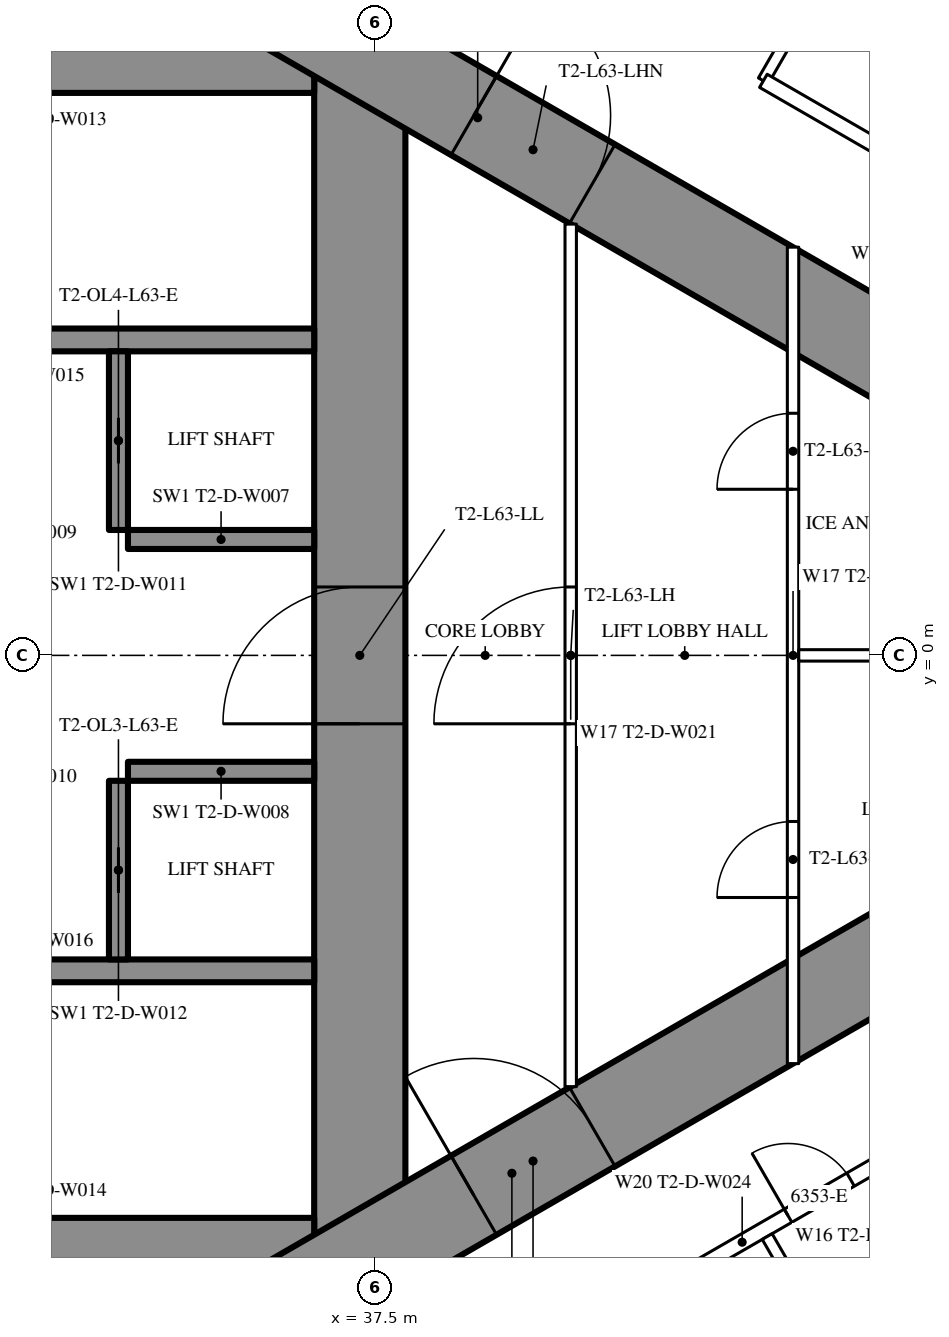
"""IFC4 building model, lengths in metres.
Left out: names, types, materials, properties, quantities, classifications, styles, units other than length and angle.
Written with IfcOpenShell. Run it as: python <this file> out.ifc"""

import sys

from ifc_helpers import new_model, si_unit, direction, frame, frame_2d, origin, place, context, subcontext, project, spatial, rectangle, extrude, element, fill, save


model = new_model("IFC4")
c1 = context("Model", 3, precision=1e-05, world=origin(), true_north=direction((0.0, 1.0)))
c2 = subcontext(c1, "Body", "Model", "MODEL_VIEW")
j1 = project(units=[si_unit("LENGTHUNIT", "METRE"), si_unit("PLANEANGLEUNIT", "RADIAN")], contexts=[c1])
p1 = place(None, origin())
s1 = spatial("IfcSite", under=j1, at=p1, CompositionType="ELEMENT")
p2 = place(p1, origin())
s2 = spatial("IfcBuilding", under=s1, at=p2, CompositionType="ELEMENT")
p3 = place(p2, frame((0.0, 0.0, 236.9)))
s3 = spatial("IfcBuildingStorey", under=s2, at=p3, CompositionType="ELEMENT", Elevation=236.9)
p4 = place(p3, frame((37.3, -8.6, 0.0), z_axis=(0.0, 0.0, 1.0), x_axis=(0.0, 1.0, 0.0)))
e1 = element("IfcWall", 1, at=p4, inside=s3, PredefinedType="SHEAR", context=c2, shape_type="SweptSolid", body=[
    extrude(rectangle(XDim=17.2, YDim=1.2, at=frame_2d((8.6, 0.0))), origin(), (0.0, 0.0, 1.0), 3.6),
])
p5 = place(p4, frame((7.7, 0.0, 0.0)))
e2 = element("IfcOpeningElement", 2, at=p5, cuts=e1, PredefinedType="OPENING", context=c2, shape_type="SweptSolid", body=[
    extrude(rectangle(XDim=1.8, YDim=2.2, at=frame_2d((0.9, 1.1))), frame((0.0, 0.61, 0.0), z_axis=(0.0, -1.0, 0.0), x_axis=(1.0, 0.0, 0.0)), (0.0, 0.0, 1.0), 1.22),
])
p6 = place(p3, frame((28.3, -8.0, 0.0), z_axis=(0.0, 0.0, 1.0), x_axis=(1.0, 0.0, 0.0)))
e3 = element("IfcWall", 3, at=p6, inside=s3, PredefinedType="SHEAR", context=c2, shape_type="SweptSolid", body=[
    extrude(rectangle(XDim=8.4, YDim=1.2, at=frame_2d((4.2, 0.0))), origin(), (0.0, 0.0, 1.0), 3.6),
])
p7 = place(p6, frame((0.25, 0.0, 0.0)))
e4 = element("IfcOpeningElement", 4, at=p7, cuts=e3, PredefinedType="OPENING", context=c2, shape_type="SweptSolid", body=[
    extrude(rectangle(XDim=1.0, YDim=2.2, at=frame_2d((0.5, 1.1))), frame((0.0, 0.61, 0.0), z_axis=(0.0, -1.0, 0.0), x_axis=(1.0, 0.0, 0.0)), (0.0, 0.0, 1.0), 1.22),
])
p8 = place(p3, frame((28.3, 8.0, 0.0), z_axis=(0.0, 0.0, 1.0), x_axis=(1.0, 0.0, 0.0)))
e5 = element("IfcWall", 5, at=p8, inside=s3, PredefinedType="SHEAR", context=c2, shape_type="SweptSolid", body=[
    extrude(rectangle(XDim=8.4, YDim=1.2, at=frame_2d((4.2, 0.0))), origin(), (0.0, 0.0, 1.0), 3.6),
])
p9 = place(p8, frame((0.25, 0.0, 0.0)))
e6 = element("IfcOpeningElement", 6, at=p9, cuts=e5, PredefinedType="OPENING", context=c2, shape_type="SweptSolid", body=[
    extrude(rectangle(XDim=1.0, YDim=2.2, at=frame_2d((0.5, 1.1))), frame((0.0, 0.61, 0.0), z_axis=(0.0, -1.0, 0.0), x_axis=(1.0, 0.0, 0.0)), (0.0, 0.0, 1.0), 1.22),
])
for number, where, z_axis, x_axis in (
    (7, (28.3, -4.15, 0.0), (0.0, 0.0, 1.0), (1.0, 0.0, 0.0)),
    (8, (28.3, 4.15, 0.0), (0.0, 0.0, 1.0), (1.0, 0.0, 0.0)),
):
    element("IfcWall", number, at=place(p3, frame(where, z_axis=z_axis, x_axis=x_axis)), inside=s3, PredefinedType="SHEAR", context=c2, shape_type="SweptSolid", body=[
        extrude(rectangle(XDim=8.4, YDim=0.3, at=frame_2d((4.2, 0.0))), origin(), (0.0, 0.0, 1.0), 3.6),
    ])
p10 = place(p3, frame((34.125, -4.0, 0.0), z_axis=(0.0, 0.0, 1.0), x_axis=(0.0, 1.0, 0.0)))
e9 = element("IfcWall", 9, at=p10, inside=s3, PredefinedType="SHEAR", context=c2, shape_type="SweptSolid", body=[
    extrude(rectangle(XDim=2.35, YDim=0.25, at=frame_2d((1.175, 0.0))), origin(), (0.0, 0.0, 1.0), 3.6),
])
p11 = place(p10, frame((0.875, 0.0, 0.0)))
e10 = element("IfcOpeningElement", 10, at=p11, cuts=e9, PredefinedType="OPENING", context=c2, shape_type="SweptSolid", body=[
    extrude(rectangle(XDim=0.6, YDim=2.0, at=frame_2d((0.3, 1.0))), frame((0.0, 0.135, 0.0), z_axis=(0.0, -1.0, 0.0), x_axis=(1.0, 0.0, 0.0)), (0.0, 0.0, 1.0), 0.27),
])
p12 = place(p3, frame((34.25, -1.525, 0.0), z_axis=(0.0, 0.0, 1.0), x_axis=(1.0, 0.0, 0.0)))
e11 = element("IfcWall", 11, at=p12, inside=s3, PredefinedType="SHEAR", context=c2, shape_type="SweptSolid", body=[
    extrude(rectangle(XDim=2.45, YDim=0.25, at=frame_2d((1.225, 0.0))), origin(), (0.0, 0.0, 1.0), 3.6),
])
p13 = place(p3, frame((34.125, 1.65, 0.0), z_axis=(0.0, 0.0, 1.0), x_axis=(0.0, 1.0, 0.0)))
e12 = element("IfcWall", 12, at=p13, inside=s3, PredefinedType="SHEAR", context=c2, shape_type="SweptSolid", body=[
    extrude(rectangle(XDim=2.35, YDim=0.25, at=frame_2d((1.175, 0.0))), origin(), (0.0, 0.0, 1.0), 3.6),
])
p14 = place(p13, frame((0.875, 0.0, 0.0)))
e13 = element("IfcOpeningElement", 13, at=p14, cuts=e12, PredefinedType="OPENING", context=c2, shape_type="SweptSolid", body=[
    extrude(rectangle(XDim=0.6, YDim=2.0, at=frame_2d((0.3, 1.0))), frame((0.0, 0.135, 0.0), z_axis=(0.0, -1.0, 0.0), x_axis=(1.0, 0.0, 0.0)), (0.0, 0.0, 1.0), 0.27),
])
p15 = place(p3, frame((34.25, 1.525, 0.0), z_axis=(0.0, 0.0, 1.0), x_axis=(1.0, 0.0, 0.0)))
e14 = element("IfcWall", 14, at=p15, inside=s3, PredefinedType="SHEAR", context=c2, shape_type="SweptSolid", body=[
    extrude(rectangle(XDim=2.45, YDim=0.25, at=frame_2d((1.225, 0.0))), origin(), (0.0, 0.0, 1.0), 3.6),
])
p16 = place(p3, frame((27.2, -13.8, 0.0), z_axis=(0.0, 0.0, 1.0), x_axis=(0.866027159892, 0.499996958321, 0.0)))
e15 = element("IfcWall", 15, at=p16, inside=s3, PredefinedType="SHEAR", context=c2, shape_type="SweptSolid", body=[
    extrude(rectangle(XDim=27.947, YDim=1.2, at=frame_2d((13.973, 0.0))), origin(), (0.0, 0.0, 1.0), 3.6),
])
p17 = place(p16, frame((4.6, 0.0, 0.0)))
e16 = element("IfcOpeningElement", 16, at=p17, cuts=e15, PredefinedType="OPENING", context=c2, shape_type="SweptSolid", body=[
    extrude(rectangle(XDim=1.0, YDim=2.2, at=frame_2d((0.5, 1.1))), frame((0.0, 0.61, 0.0), z_axis=(0.0, -1.0, 0.0), x_axis=(1.0, 0.0, 0.0)), (0.0, 0.0, 1.0), 1.22),
])
p18 = place(p16, frame((13.395, 0.0, 0.0)))
e17 = element("IfcOpeningElement", 17, at=p18, cuts=e15, PredefinedType="OPENING", context=c2, shape_type="SweptSolid", body=[
    extrude(rectangle(XDim=1.8, YDim=2.2, at=frame_2d((0.9, 1.1))), frame((0.0, 0.61, 0.0), z_axis=(0.0, -1.0, 0.0), x_axis=(1.0, 0.0, 0.0)), (0.0, 0.0, 1.0), 1.22),
])
p19 = place(p3, frame((27.2, 13.8, 0.0), z_axis=(0.0, 0.0, 1.0), x_axis=(0.866024515034, -0.500001539357, 0.0)))
e18 = element("IfcWall", 18, at=p19, inside=s3, PredefinedType="SHEAR", context=c2, shape_type="SweptSolid", body=[
    extrude(rectangle(XDim=26.907, YDim=1.2, at=frame_2d((13.454, 0.0))), origin(), (0.0, 0.0, 1.0), 3.6),
])
p20 = place(p19, frame((4.6, 0.0, 0.0)))
e19 = element("IfcOpeningElement", 19, at=p20, cuts=e18, PredefinedType="OPENING", context=c2, shape_type="SweptSolid", body=[
    extrude(rectangle(XDim=1.0, YDim=2.2, at=frame_2d((0.5, 1.1))), frame((0.0, 0.61, 0.0), z_axis=(0.0, -1.0, 0.0), x_axis=(1.0, 0.0, 0.0)), (0.0, 0.0, 1.0), 1.22),
])
p21 = place(p19, frame((13.395, 0.0, 0.0)))
e20 = element("IfcOpeningElement", 20, at=p21, cuts=e18, PredefinedType="OPENING", context=c2, shape_type="SweptSolid", body=[
    extrude(rectangle(XDim=1.8, YDim=2.2, at=frame_2d((0.9, 1.1))), frame((0.0, 0.61, 0.0), z_axis=(0.0, -1.0, 0.0), x_axis=(1.0, 0.0, 0.0)), (0.0, 0.0, 1.0), 1.22),
])
p22 = place(p3, frame((28.959, -15.44, 0.0), z_axis=(0.0, 0.0, 1.0), x_axis=(0.866025227435, 0.500000305447, 0.0)))
e21 = element("IfcWall", 21, at=p22, inside=s3, PredefinedType="PARTITIONING", context=c2, shape_type="SweptSolid", body=[
    extrude(rectangle(XDim=30.88, YDim=0.2, at=frame_2d((15.44, 0.0))), origin(), (0.0, 0.0, 1.0), 3.35),
])
p23 = place(p22, frame((1.494, 0.0, 0.0)))
e22 = element("IfcOpeningElement", 22, at=p23, cuts=e21, PredefinedType="OPENING", context=c2, shape_type="SweptSolid", body=[
    extrude(rectangle(XDim=1.8, YDim=2.03, at=frame_2d((0.9, 1.015))), frame((0.0, 0.11, 0.0), z_axis=(0.0, -1.0, 0.0), x_axis=(1.0, 0.0, 0.0)), (0.0, 0.0, 1.0), 0.22),
])
p24 = place(p22, frame((7.687, 0.0, 0.0)))
e23 = element("IfcOpeningElement", 23, at=p24, cuts=e21, PredefinedType="OPENING", context=c2, shape_type="SweptSolid", body=[
    extrude(rectangle(XDim=1.0, YDim=2.2, at=frame_2d((0.5, 1.1))), frame((0.0, 0.11, 0.0), z_axis=(0.0, -1.0, 0.0), x_axis=(1.0, 0.0, 0.0)), (0.0, 0.0, 1.0), 0.22),
])
p25 = place(p22, frame((16.137, 0.0, 0.0)))
e24 = element("IfcOpeningElement", 24, at=p25, cuts=e21, PredefinedType="OPENING", context=c2, shape_type="SweptSolid", body=[
    extrude(rectangle(XDim=0.95, YDim=2.2, at=frame_2d((0.475, 1.1))), frame((0.0, 0.11, 0.0), z_axis=(0.0, -1.0, 0.0), x_axis=(1.0, 0.0, 0.0)), (0.0, 0.0, 1.0), 0.22),
])
p26 = place(p22, frame((20.021, 0.0, 0.0)))
e25 = element("IfcOpeningElement", 25, at=p26, cuts=e21, PredefinedType="OPENING", context=c2, shape_type="SweptSolid", body=[
    extrude(rectangle(XDim=0.95, YDim=2.2, at=frame_2d((0.475, 1.1))), frame((0.0, 0.11, 0.0), z_axis=(0.0, -1.0, 0.0), x_axis=(1.0, 0.0, 0.0)), (0.0, 0.0, 1.0), 0.22),
])
p27 = place(p22, frame((26.253, 0.0, 0.0)))
e26 = element("IfcOpeningElement", 26, at=p27, cuts=e21, PredefinedType="OPENING", context=c2, shape_type="SweptSolid", body=[
    extrude(rectangle(XDim=0.95, YDim=2.2, at=frame_2d((0.475, 1.1))), frame((0.0, 0.11, 0.0), z_axis=(0.0, -1.0, 0.0), x_axis=(1.0, 0.0, 0.0)), (0.0, 0.0, 1.0), 0.22),
])
p28 = place(p3, frame((42.66, -7.646, 0.0), z_axis=(0.0, 0.0, 1.0), x_axis=(0.499996592859, -0.866027370889, 0.0)))
e27 = element("IfcWall", 27, at=p28, inside=s3, PredefinedType="PARTITIONING", context=c2, shape_type="SweptSolid", body=[
    extrude(rectangle(XDim=6.398, YDim=0.15, at=frame_2d((3.199, 0.0))), origin(), (0.0, 0.0, 1.0), 2.45),
])
p29 = place(p3, frame((42.61, 7.559, 0.0), z_axis=(0.0, 0.0, 1.0), x_axis=(0.500014058812, 0.866017286774, 0.0)))
e28 = element("IfcWall", 28, at=p29, inside=s3, PredefinedType="PARTITIONING", context=c2, shape_type="SweptSolid", body=[
    extrude(rectangle(XDim=6.498, YDim=0.15, at=frame_2d((3.249, 0.0))), origin(), (0.0, 0.0, 1.0), 2.45),
])
p30 = place(p3, frame((43.425, -8.821, 0.0), z_axis=(0.0, 0.0, 1.0), x_axis=(0.866006523861, 0.500032699561, 0.0)))
e29 = element("IfcWall", 29, at=p30, inside=s3, PredefinedType="PARTITIONING", context=c2, shape_type="SweptSolid", body=[
    extrude(rectangle(XDim=2.475, YDim=0.15, at=frame_2d((1.237, 0.0))), origin(), (0.0, 0.0, 1.0), 3.35),
])
p31 = place(p3, frame((42.61, 7.559, 0.0), z_axis=(0.0, 0.0, 1.0), x_axis=(0.866032081755, -0.499988433238, 0.0)))
e30 = element("IfcWall", 30, at=p31, inside=s3, PredefinedType="PARTITIONING", context=c2, shape_type="SweptSolid", body=[
    extrude(rectangle(XDim=4.741, YDim=0.2, at=frame_2d((2.37, 0.0))), origin(), (0.0, 0.0, 1.0), 3.35),
])
p32 = place(p31, frame((2.725, 0.0, 0.0)))
e31 = element("IfcOpeningElement", 31, at=p32, cuts=e30, PredefinedType="OPENING", context=c2, shape_type="SweptSolid", body=[
    extrude(rectangle(XDim=0.95, YDim=2.2, at=frame_2d((0.475, 1.1))), frame((0.0, 0.11, 0.0), z_axis=(0.0, -1.0, 0.0), x_axis=(1.0, 0.0, 0.0)), (0.0, 0.0, 1.0), 0.22),
])
p33 = place(p3, frame((40.075, -5.674, 0.0), z_axis=(0.0, 0.0, 1.0), x_axis=(0.0, 1.0, 0.0)))
e32 = element("IfcWall", 32, at=p33, inside=s3, PredefinedType="PARTITIONING", context=c2, shape_type="SweptSolid", body=[
    extrude(rectangle(XDim=11.348, YDim=0.15, at=frame_2d((5.674, 0.0))), origin(), (0.0, 0.0, 1.0), 3.35),
])
p34 = place(p33, frame((4.774, 0.0, 0.0)))
e33 = element("IfcOpeningElement", 33, at=p34, cuts=e32, PredefinedType="OPENING", context=c2, shape_type="SweptSolid", body=[
    extrude(rectangle(XDim=1.8, YDim=2.2, at=frame_2d((0.9, 1.1))), frame((0.0, 0.085, 0.0), z_axis=(0.0, -1.0, 0.0), x_axis=(1.0, 0.0, 0.0)), (0.0, 0.0, 1.0), 0.17),
])
p35 = place(p3, frame((43.0, -5.371, 0.0), z_axis=(0.0, 0.0, 1.0), x_axis=(0.0, 1.0, 0.0)))
e34 = element("IfcWall", 34, at=p35, inside=s3, PredefinedType="PARTITIONING", context=c2, shape_type="SweptSolid", body=[
    extrude(rectangle(XDim=10.741, YDim=0.15, at=frame_2d((5.371, 0.0))), origin(), (0.0, 0.0, 1.0), 3.35),
])
p36 = place(p35, frame((2.185, 0.0, 0.0)))
e35 = element("IfcOpeningElement", 35, at=p36, cuts=e34, PredefinedType="OPENING", context=c2, shape_type="SweptSolid", body=[
    extrude(rectangle(XDim=1.0, YDim=2.2, at=frame_2d((0.5, 1.1))), frame((0.0, 0.085, 0.0), z_axis=(0.0, -1.0, 0.0), x_axis=(1.0, 0.0, 0.0)), (0.0, 0.0, 1.0), 0.17),
])
p37 = place(p35, frame((7.556, 0.0, 0.0)))
e36 = element("IfcOpeningElement", 36, at=p37, cuts=e34, PredefinedType="OPENING", context=c2, shape_type="SweptSolid", body=[
    extrude(rectangle(XDim=1.0, YDim=2.2, at=frame_2d((0.5, 1.1))), frame((0.0, 0.085, 0.0), z_axis=(0.0, -1.0, 0.0), x_axis=(1.0, 0.0, 0.0)), (0.0, 0.0, 1.0), 0.17),
])
p38 = place(p3, frame((43.075, 0.0, 0.0), z_axis=(0.0, 0.0, 1.0), x_axis=(1.0, 0.0, 0.0)))
e37 = element("IfcWall", 37, at=p38, inside=s3, PredefinedType="PARTITIONING", context=c2, shape_type="SweptSolid", body=[
    extrude(rectangle(XDim=9.227, YDim=0.15, at=frame_2d((4.614, 0.0))), origin(), (0.0, 0.0, 1.0), 2.45),
])
p39 = place(p25, origin())
e38 = element("IfcDoor", 38, at=p39, inside=s3, OperationType="SINGLE_SWING_LEFT", PredefinedType="DOOR", context=c2, shape_type="SweptSolid", body=[
    extrude(rectangle(XDim=0.95, YDim=2.2, at=frame_2d((0.475, 1.1))), frame((0.0, 0.025, 0.0), z_axis=(0.0, -1.0, 0.0), x_axis=(1.0, 0.0, 0.0)), (0.0, 0.0, 1.0), 0.05),
])
fill(e24, e38)
p40 = place(p34, origin())
e39 = element("IfcDoor", 39, at=p40, inside=s3, OperationType="DOUBLE_DOOR_SINGLE_SWING", PredefinedType="DOOR", context=c2, shape_type="SweptSolid", body=[
    extrude(rectangle(XDim=1.8, YDim=2.2, at=frame_2d((0.9, 1.1))), frame((0.0, 0.025, 0.0), z_axis=(0.0, -1.0, 0.0), x_axis=(1.0, 0.0, 0.0)), (0.0, 0.0, 1.0), 0.05),
])
fill(e33, e39)
p41 = place(p36, origin())
e40 = element("IfcDoor", 40, at=p41, inside=s3, OperationType="SINGLE_SWING_LEFT", PredefinedType="DOOR", context=c2, shape_type="SweptSolid", body=[
    extrude(rectangle(XDim=1.0, YDim=2.2, at=frame_2d((0.5, 1.1))), frame((0.0, 0.025, 0.0), z_axis=(0.0, -1.0, 0.0), x_axis=(1.0, 0.0, 0.0)), (0.0, 0.0, 1.0), 0.05),
])
fill(e35, e40)
p42 = place(p37, origin())
e41 = element("IfcDoor", 41, at=p42, inside=s3, OperationType="SINGLE_SWING_LEFT", PredefinedType="DOOR", context=c2, shape_type="SweptSolid", body=[
    extrude(rectangle(XDim=1.0, YDim=2.2, at=frame_2d((0.5, 1.1))), frame((0.0, 0.025, 0.0), z_axis=(0.0, -1.0, 0.0), x_axis=(1.0, 0.0, 0.0)), (0.0, 0.0, 1.0), 0.05),
])
fill(e36, e41)
p43 = place(p18, origin())
e42 = element("IfcDoor", 42, at=p43, inside=s3, OperationType="DOUBLE_DOOR_SINGLE_SWING", PredefinedType="DOOR", context=c2, shape_type="SweptSolid", body=[
    extrude(rectangle(XDim=1.8, YDim=2.2, at=frame_2d((0.9, 1.1))), frame((0.0, 0.025, 0.0), z_axis=(0.0, -1.0, 0.0), x_axis=(1.0, 0.0, 0.0)), (0.0, 0.0, 1.0), 0.05),
])
fill(e17, e42)
p44 = place(p21, origin())
e43 = element("IfcDoor", 43, at=p44, inside=s3, OperationType="DOUBLE_DOOR_SINGLE_SWING", PredefinedType="DOOR", context=c2, shape_type="SweptSolid", body=[
    extrude(rectangle(XDim=1.8, YDim=2.2, at=frame_2d((0.9, 1.1))), frame((0.0, 0.025, 0.0), z_axis=(0.0, -1.0, 0.0), x_axis=(1.0, 0.0, 0.0)), (0.0, 0.0, 1.0), 0.05),
])
fill(e20, e43)
p45 = place(p5, origin())
e44 = element("IfcDoor", 44, at=p45, inside=s3, OperationType="DOUBLE_DOOR_SINGLE_SWING", PredefinedType="DOOR", context=c2, shape_type="SweptSolid", body=[
    extrude(rectangle(XDim=1.8, YDim=2.2, at=frame_2d((0.9, 1.1))), frame((0.0, 0.025, 0.0), z_axis=(0.0, -1.0, 0.0), x_axis=(1.0, 0.0, 0.0)), (0.0, 0.0, 1.0), 0.05),
])
fill(e2, e44)
p46 = place(p11, origin())
e45 = element("IfcDoor", 45, at=p46, inside=s3, OperationType="SLIDING_TO_LEFT", PredefinedType="DOOR", context=c2, shape_type="SweptSolid", body=[
    extrude(rectangle(XDim=0.6, YDim=2.0, at=frame_2d((0.3, 1.0))), frame((0.0, 0.025, 0.0), z_axis=(0.0, -1.0, 0.0), x_axis=(1.0, 0.0, 0.0)), (0.0, 0.0, 1.0), 0.05),
])
fill(e10, e45)
p47 = place(p14, origin())
e46 = element("IfcDoor", 46, at=p47, inside=s3, OperationType="SLIDING_TO_LEFT", PredefinedType="DOOR", context=c2, shape_type="SweptSolid", body=[
    extrude(rectangle(XDim=0.6, YDim=2.0, at=frame_2d((0.3, 1.0))), frame((0.0, 0.025, 0.0), z_axis=(0.0, -1.0, 0.0), x_axis=(1.0, 0.0, 0.0)), (0.0, 0.0, 1.0), 0.05),
])
fill(e13, e46)
save(model, sys.argv[1])
